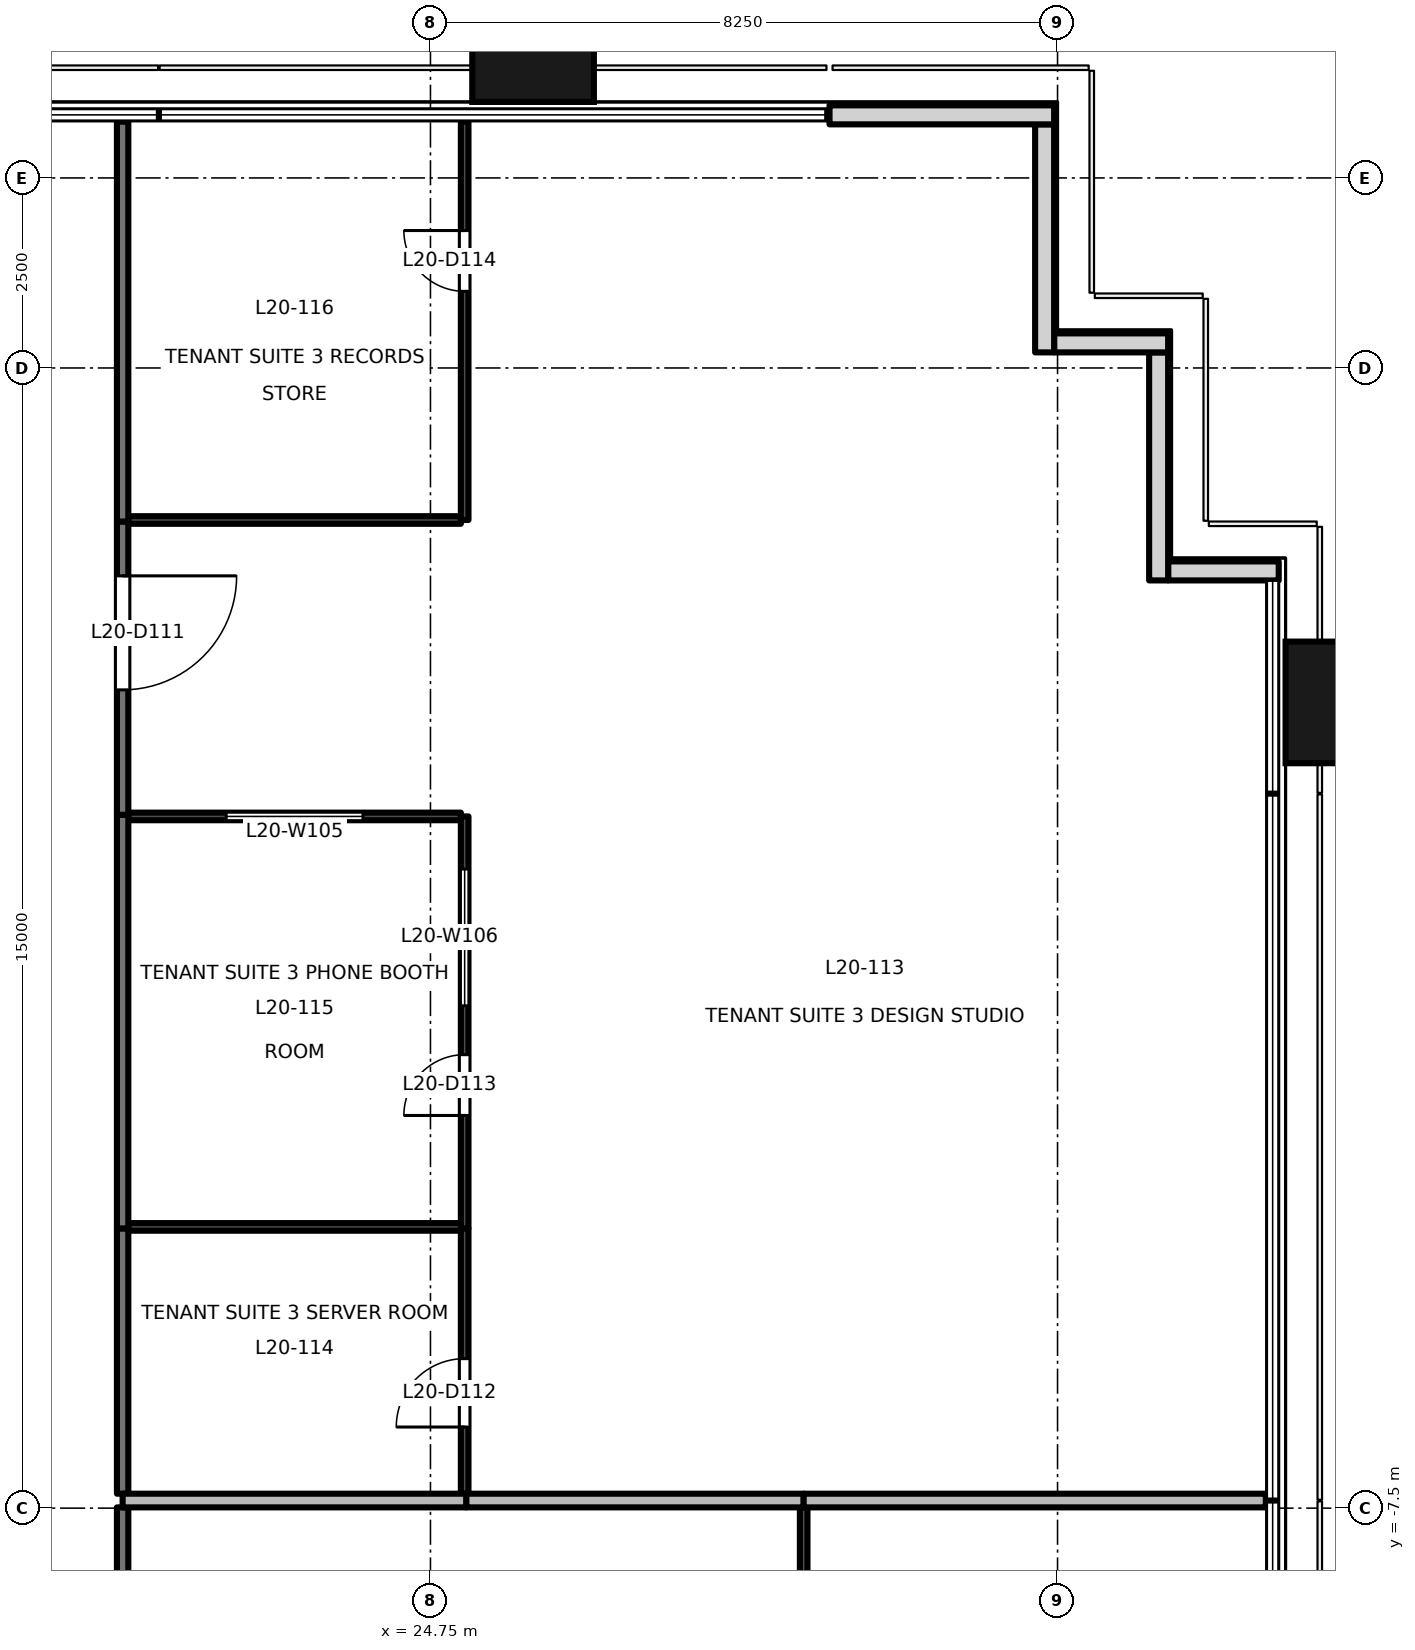
"""IFC4 building model, lengths in metres.
Left out: names, types, materials, properties, quantities, classifications, styles, units other than length and angle.
Written with IfcOpenShell. Run it as: python <this file> out.ifc"""

import sys

from ifc_helpers import new_model, si_unit, direction, frame, frame_2d, origin, origin_2d, place, context, subcontext, project, spatial, rectangle, extrude, element, fill, save


model = new_model("IFC4")
c1 = context("Model", 3, precision=1e-05, world=origin(), true_north=direction((0.0, 1.0)))
c2 = subcontext(c1, "Body", "Model", "MODEL_VIEW")
j1 = project(units=[si_unit("LENGTHUNIT", "METRE"), si_unit("PLANEANGLEUNIT", "RADIAN")], contexts=[c1])
p1 = place(None, origin())
s1 = spatial("IfcSite", under=j1, at=p1, CompositionType="ELEMENT")
p2 = place(p1, origin())
s2 = spatial("IfcBuilding", under=s1, at=p2, CompositionType="ELEMENT")
p3 = place(p2, frame((0.0, 0.0, 91.7)))
s3 = spatial("IfcBuildingStorey", under=s2, at=p3, CompositionType="ELEMENT", Elevation=91.7)
for number, where, z_axis, x_axis in (
    (1, (36.9, 3.1, -0.2), (0.0, 0.0, 1.0), (0.0, 1.0, 0.0)),
    (2, (26.1, 11.9, -0.2), (0.0, 0.0, 1.0), (1.0, 0.0, 0.0)),
):
    element("IfcColumn", number, at=place(p3, frame(where, z_axis=z_axis, x_axis=x_axis)), inside=s3, PredefinedType="COLUMN", context=c2, shape_type="SweptSolid", body=[
        extrude(rectangle(XDim=1.6, YDim=1.8, at=origin_2d()), origin(), (0.0, 0.0, 1.0), 4.0),
    ])
p4 = place(p3, frame((35.91, 4.83, 0.0), z_axis=(0.0, 0.0, 1.0), x_axis=(-1.0, 0.0, 0.0)))
e3 = element("IfcWall", 3, at=p4, inside=s3, PredefinedType="SOLIDWALL", context=c2, shape_type="SweptSolid", body=[
    extrude(rectangle(XDim=1.455, YDim=0.25, at=frame_2d((0.728, 0.0))), origin(), (0.0, 0.0, 1.0), 3.8),
])
p5 = place(p3, frame((34.33, 4.705, 0.0), z_axis=(0.0, 0.0, 1.0), x_axis=(0.0, 1.0, 0.0)))
e4 = element("IfcWall", 4, at=p5, inside=s3, PredefinedType="SOLIDWALL", context=c2, shape_type="SweptSolid", body=[
    extrude(rectangle(XDim=3.0, YDim=0.25, at=frame_2d((1.5, 0.0))), origin(), (0.0, 0.0, 1.0), 3.8),
])
p6 = place(p3, frame((34.455, 7.83, 0.0), z_axis=(0.0, 0.0, 1.0), x_axis=(-1.0, 0.0, 0.0)))
e5 = element("IfcWall", 5, at=p6, inside=s3, PredefinedType="SOLIDWALL", context=c2, shape_type="SweptSolid", body=[
    extrude(rectangle(XDim=1.5, YDim=0.25, at=frame_2d((0.75, 0.0))), origin(), (0.0, 0.0, 1.0), 3.8),
])
p7 = place(p3, frame((32.83, 7.705, 0.0), z_axis=(0.0, 0.0, 1.0), x_axis=(0.0, 1.0, 0.0)))
e6 = element("IfcWall", 6, at=p7, inside=s3, PredefinedType="SOLIDWALL", context=c2, shape_type="SweptSolid", body=[
    extrude(rectangle(XDim=3.0, YDim=0.25, at=frame_2d((1.5, 0.0))), origin(), (0.0, 0.0, 1.0), 3.8),
])
p8 = place(p3, frame((32.955, 10.83, 0.0), z_axis=(0.0, 0.0, 1.0), x_axis=(-1.0, 0.0, 0.0)))
e7 = element("IfcWall", 7, at=p8, inside=s3, PredefinedType="SOLIDWALL", context=c2, shape_type="SweptSolid", body=[
    extrude(rectangle(XDim=2.955, YDim=0.25, at=frame_2d((1.478, 0.0))), origin(), (0.0, 0.0, 1.0), 3.8),
])
p9 = place(p3, frame((20.7, -7.49, 0.0), z_axis=(0.0, 0.0, 1.0), x_axis=(0.0, -1.0, 0.0)))
e8 = element("IfcWall", 8, at=p9, inside=s3, PredefinedType="PARTITIONING", context=c2, shape_type="SweptSolid", body=[
    extrude(rectangle(XDim=3.59, YDim=0.15, at=frame_2d((1.795, 0.0))), origin(), (0.0, 0.0, 1.0), 2.9),
])
p10 = place(p9, frame((0.895, 0.0, 0.0)))
e9 = element("IfcOpeningElement", 9, at=p10, cuts=e8, PredefinedType="OPENING", context=c2, shape_type="SweptSolid", body=[
    extrude(rectangle(XDim=1.8, YDim=2.1, at=frame_2d((0.9, 1.05))), frame((0.0, 0.085, 0.0), z_axis=(0.0, -1.0, 0.0), x_axis=(1.0, 0.0, 0.0)), (0.0, 0.0, 1.0), 0.171),
])
p11 = place(p3, frame((20.7, 5.48, 0.0), z_axis=(0.0, 0.0, 1.0), x_axis=(0.0, -1.0, 0.0)))
e10 = element("IfcWall", 10, at=p11, inside=s3, PredefinedType="PARTITIONING", context=c2, shape_type="SweptSolid", body=[
    extrude(rectangle(XDim=3.86, YDim=0.15, at=frame_2d((1.93, 0.0))), origin(), (0.0, 0.0, 1.0), 2.9),
])
p12 = place(p11, frame((0.715, 0.0, 0.0)))
e11 = element("IfcOpeningElement", 11, at=p12, cuts=e10, PredefinedType="OPENING", context=c2, shape_type="SweptSolid", body=[
    extrude(rectangle(XDim=1.5, YDim=2.1, at=frame_2d((0.75, 1.05))), frame((0.0, 0.085, 0.0), z_axis=(0.0, -1.0, 0.0), x_axis=(1.0, 0.0, 0.0)), (0.0, 0.0, 1.0), 0.171),
])
p13 = place(p3, frame((20.7, -3.82, 0.0), z_axis=(0.0, 0.0, 1.0), x_axis=(0.0, -1.0, 0.0)))
e12 = element("IfcWall", 12, at=p13, inside=s3, PredefinedType="PARTITIONING", context=c2, shape_type="SweptSolid", body=[
    extrude(rectangle(XDim=3.49, YDim=0.15, at=frame_2d((1.745, 0.0))), origin(), (0.0, 0.0, 1.0), 2.9),
])
p14 = place(p3, frame((20.7, 1.62, 0.0), z_axis=(0.0, 0.0, 1.0), x_axis=(0.0, -1.0, 0.0)))
e13 = element("IfcWall", 13, at=p14, inside=s3, PredefinedType="PARTITIONING", context=c2, shape_type="SweptSolid", body=[
    extrude(rectangle(XDim=5.44, YDim=0.15, at=frame_2d((2.72, 0.0))), origin(), (0.0, 0.0, 1.0), 2.9),
])
p15 = place(p3, frame((20.7, 10.74, 0.0), z_axis=(0.0, 0.0, 1.0), x_axis=(0.0, -1.0, 0.0)))
e14 = element("IfcWall", 14, at=p15, inside=s3, PredefinedType="PARTITIONING", context=c2, shape_type="SweptSolid", body=[
    extrude(rectangle(XDim=5.26, YDim=0.15, at=frame_2d((2.63, 0.0))), origin(), (0.0, 0.0, 1.0), 3.8),
])
p16 = place(p3, frame((29.66, -7.49, 0.0), z_axis=(0.0, 0.0, 1.0), x_axis=(0.0, -1.0, 0.0)))
e15 = element("IfcWall", 15, at=p16, inside=s3, PredefinedType="PARTITIONING", context=c2, shape_type="SweptSolid", body=[
    extrude(rectangle(XDim=6.11, YDim=0.1, at=frame_2d((3.055, 0.0))), origin(), (0.0, 0.0, 1.0), 2.9),
])
p17 = place(p16, frame((1.663, 0.0, 0.0)))
e16 = element("IfcOpeningElement", 16, at=p17, cuts=e15, PredefinedType="OPENING", context=c2, shape_type="SweptSolid", body=[
    extrude(rectangle(XDim=0.9, YDim=2.1, at=frame_2d((0.45, 1.05))), frame((0.0, 0.061, 0.0), z_axis=(0.0, -1.0, 0.0), x_axis=(1.0, 0.0, 0.0)), (0.0, 0.0, 1.0), 0.121),
])
p18 = place(p16, frame((3.412, 0.0, 0.9)))
e17 = element("IfcOpeningElement", 17, at=p18, cuts=e15, PredefinedType="OPENING", context=c2, shape_type="SweptSolid", body=[
    extrude(rectangle(XDim=1.8, YDim=1.2, at=frame_2d((0.9, 0.6))), frame((0.0, 0.061, 0.0), z_axis=(0.0, -1.0, 0.0), x_axis=(1.0, 0.0, 0.0)), (0.0, 0.0, 1.0), 0.121),
])
p19 = place(p3, frame((25.22, -7.4, 0.0), z_axis=(0.0, 0.0, 1.0), x_axis=(1.0, 0.0, 0.0)))
e18 = element("IfcWall", 18, at=p19, inside=s3, PredefinedType="PARTITIONING", context=c2, shape_type="SweptSolid", body=[
    extrude(rectangle(XDim=4.44, YDim=0.18, at=frame_2d((2.22, 0.0))), origin(), (0.0, 0.0, 1.0), 3.8),
])
p20 = place(p3, frame((20.7, -7.4, 0.0), z_axis=(0.0, 0.0, 1.0), x_axis=(1.0, 0.0, 0.0)))
e19 = element("IfcWall", 19, at=p20, inside=s3, PredefinedType="PARTITIONING", context=c2, shape_type="SweptSolid", body=[
    extrude(rectangle(XDim=4.52, YDim=0.18, at=frame_2d((2.26, 0.0))), origin(), (0.0, 0.0, 1.0), 3.8),
])
p21 = place(p3, frame((29.66, -7.4, 0.0), z_axis=(0.0, 0.0, 1.0), x_axis=(1.0, 0.0, 0.0)))
e20 = element("IfcWall", 20, at=p21, inside=s3, PredefinedType="PARTITIONING", context=c2, shape_type="SweptSolid", body=[
    extrude(rectangle(XDim=6.08, YDim=0.18, at=frame_2d((3.04, 0.0))), origin(), (0.0, 0.0, 1.0), 3.8),
])
p22 = place(p3, frame((25.2, -7.31, 0.0), z_axis=(0.0, 0.0, 1.0), x_axis=(0.0, 1.0, 0.0)))
e21 = element("IfcWall", 21, at=p22, inside=s3, PredefinedType="PARTITIONING", context=c2, shape_type="SweptSolid", body=[
    extrude(rectangle(XDim=3.49, YDim=0.1, at=frame_2d((1.745, 0.0))), origin(), (0.0, 0.0, 1.0), 2.9),
])
p23 = place(p22, frame((0.877, 0.0, 0.0)))
e22 = element("IfcOpeningElement", 22, at=p23, cuts=e21, PredefinedType="OPENING", context=c2, shape_type="SweptSolid", body=[
    extrude(rectangle(XDim=0.9, YDim=2.1, at=frame_2d((0.45, 1.05))), frame((0.0, 0.061, 0.0), z_axis=(0.0, -1.0, 0.0), x_axis=(1.0, 0.0, 0.0)), (0.0, 0.0, 1.0), 0.121),
])
p24 = place(p3, frame((25.15, 1.6, 0.0), z_axis=(0.0, 0.0, 1.0), x_axis=(-1.0, 0.0, 0.0)))
e23 = element("IfcWall", 23, at=p24, inside=s3, PredefinedType="PARTITIONING", context=c2, shape_type="SweptSolid", body=[
    extrude(rectangle(XDim=4.375, YDim=0.1, at=frame_2d((2.188, 0.0))), origin(), (0.0, 0.0, 1.0), 3.8),
])
p25 = place(p24, frame((1.288, 0.0, 0.9)))
e24 = element("IfcOpeningElement", 24, at=p25, cuts=e23, PredefinedType="OPENING", context=c2, shape_type="SweptSolid", body=[
    extrude(rectangle(XDim=1.8, YDim=1.2, at=frame_2d((0.9, 0.6))), frame((0.0, 0.061, 0.0), z_axis=(0.0, -1.0, 0.0), x_axis=(1.0, 0.0, 0.0)), (0.0, 0.0, 1.0), 0.121),
])
p26 = place(p3, frame((25.2, -3.82, 0.0), z_axis=(0.0, 0.0, 1.0), x_axis=(0.0, 1.0, 0.0)))
e25 = element("IfcWall", 25, at=p26, inside=s3, PredefinedType="PARTITIONING", context=c2, shape_type="SweptSolid", body=[
    extrude(rectangle(XDim=5.42, YDim=0.1, at=frame_2d((2.71, 0.0))), origin(), (0.0, 0.0, 1.0), 2.9),
])
p27 = place(p26, frame((1.486, 0.0, 0.0)))
e26 = element("IfcOpeningElement", 26, at=p27, cuts=e25, PredefinedType="OPENING", context=c2, shape_type="SweptSolid", body=[
    extrude(rectangle(XDim=0.8, YDim=2.1, at=frame_2d((0.4, 1.05))), frame((0.0, 0.061, 0.0), z_axis=(0.0, -1.0, 0.0), x_axis=(1.0, 0.0, 0.0)), (0.0, 0.0, 1.0), 0.121),
])
p28 = place(p26, frame((2.928, 0.0, 0.9)))
e27 = element("IfcOpeningElement", 27, at=p28, cuts=e25, PredefinedType="OPENING", context=c2, shape_type="SweptSolid", body=[
    extrude(rectangle(XDim=1.8, YDim=1.2, at=frame_2d((0.9, 0.6))), frame((0.0, 0.061, 0.0), z_axis=(0.0, -1.0, 0.0), x_axis=(1.0, 0.0, 0.0)), (0.0, 0.0, 1.0), 0.121),
])
p29 = place(p3, frame((20.775, 5.5, 0.0), z_axis=(0.0, 0.0, 1.0), x_axis=(1.0, 0.0, 0.0)))
e28 = element("IfcWall", 28, at=p29, inside=s3, PredefinedType="PARTITIONING", context=c2, shape_type="SweptSolid", body=[
    extrude(rectangle(XDim=4.375, YDim=0.1, at=frame_2d((2.188, 0.0))), origin(), (0.0, 0.0, 1.0), 3.8),
])
p30 = place(p3, frame((25.2, 5.5, 0.0), z_axis=(0.0, 0.0, 1.0), x_axis=(0.0, 1.0, 0.0)))
e29 = element("IfcWall", 29, at=p30, inside=s3, PredefinedType="PARTITIONING", context=c2, shape_type="SweptSolid", body=[
    extrude(rectangle(XDim=5.24, YDim=0.1, at=frame_2d((2.62, 0.0))), origin(), (0.0, 0.0, 1.0), 3.8),
])
p31 = place(p30, frame((3.008, 0.0, 0.0)))
e30 = element("IfcOpeningElement", 30, at=p31, cuts=e29, PredefinedType="OPENING", context=c2, shape_type="SweptSolid", body=[
    extrude(rectangle(XDim=0.8, YDim=2.1, at=frame_2d((0.4, 1.05))), frame((0.0, 0.061, 0.0), z_axis=(0.0, -1.0, 0.0), x_axis=(1.0, 0.0, 0.0)), (0.0, 0.0, 1.0), 0.121),
])
p32 = place(p3, frame((20.775, -3.8, 0.0), z_axis=(0.0, 0.0, 1.0), x_axis=(1.0, 0.0, 0.0)))
e31 = element("IfcWall", 31, at=p32, inside=s3, PredefinedType="PARTITIONING", context=c2, shape_type="SweptSolid", body=[
    extrude(rectangle(XDim=4.375, YDim=0.1, at=frame_2d((2.188, 0.0))), origin(), (0.0, 0.0, 1.0), 3.8),
])
p33 = place(p12, origin())
e32 = element("IfcDoor", 32, at=p33, inside=s3, OperationType="DOUBLE_DOOR_SINGLE_SWING", PredefinedType="DOOR", context=c2, shape_type="SweptSolid", body=[
    extrude(rectangle(XDim=1.5, YDim=2.1, at=frame_2d((0.75, 1.05))), frame((0.0, 0.025, 0.0), z_axis=(0.0, -1.0, 0.0), x_axis=(1.0, 0.0, 0.0)), (0.0, 0.0, 1.0), 0.05),
])
fill(e11, e32)
p34 = place(p23, origin())
e33 = element("IfcDoor", 33, at=p34, inside=s3, OperationType="SINGLE_SWING_LEFT", PredefinedType="DOOR", context=c2, shape_type="SweptSolid", body=[
    extrude(rectangle(XDim=0.9, YDim=2.1, at=frame_2d((0.45, 1.05))), frame((0.0, 0.025, 0.0), z_axis=(0.0, -1.0, 0.0), x_axis=(1.0, 0.0, 0.0)), (0.0, 0.0, 1.0), 0.05),
])
fill(e22, e33)
p35 = place(p27, origin())
e34 = element("IfcDoor", 34, at=p35, inside=s3, OperationType="SINGLE_SWING_LEFT", PredefinedType="DOOR", context=c2, shape_type="SweptSolid", body=[
    extrude(rectangle(XDim=0.8, YDim=2.1, at=frame_2d((0.4, 1.05))), frame((0.0, 0.025, 0.0), z_axis=(0.0, -1.0, 0.0), x_axis=(1.0, 0.0, 0.0)), (0.0, 0.0, 1.0), 0.05),
])
fill(e26, e34)
p36 = place(p31, origin())
e35 = element("IfcDoor", 35, at=p36, inside=s3, OperationType="SINGLE_SWING_RIGHT", PredefinedType="DOOR", context=c2, shape_type="SweptSolid", body=[
    extrude(rectangle(XDim=0.8, YDim=2.1, at=frame_2d((0.4, 1.05))), frame((0.0, 0.025, 0.0), z_axis=(0.0, -1.0, 0.0), x_axis=(1.0, 0.0, 0.0)), (0.0, 0.0, 1.0), 0.05),
])
fill(e30, e35)
p37 = place(p25, origin())
e36 = element("IfcWindow", 36, at=p37, inside=s3, PartitioningType="SINGLE_PANEL", PredefinedType="WINDOW", context=c2, shape_type="SweptSolid", body=[
    extrude(rectangle(XDim=1.8, YDim=1.2, at=frame_2d((0.9, 0.6))), frame((0.0, 0.03, 0.0), z_axis=(0.0, -1.0, 0.0), x_axis=(1.0, 0.0, 0.0)), (0.0, 0.0, 1.0), 0.06),
])
fill(e24, e36)
p38 = place(p28, origin())
e37 = element("IfcWindow", 37, at=p38, inside=s3, PartitioningType="SINGLE_PANEL", PredefinedType="WINDOW", context=c2, shape_type="SweptSolid", body=[
    extrude(rectangle(XDim=1.8, YDim=1.2, at=frame_2d((0.9, 0.6))), frame((0.0, 0.03, 0.0), z_axis=(0.0, -1.0, 0.0), x_axis=(1.0, 0.0, 0.0)), (0.0, 0.0, 1.0), 0.06),
])
fill(e27, e37)
save(model, sys.argv[1])
